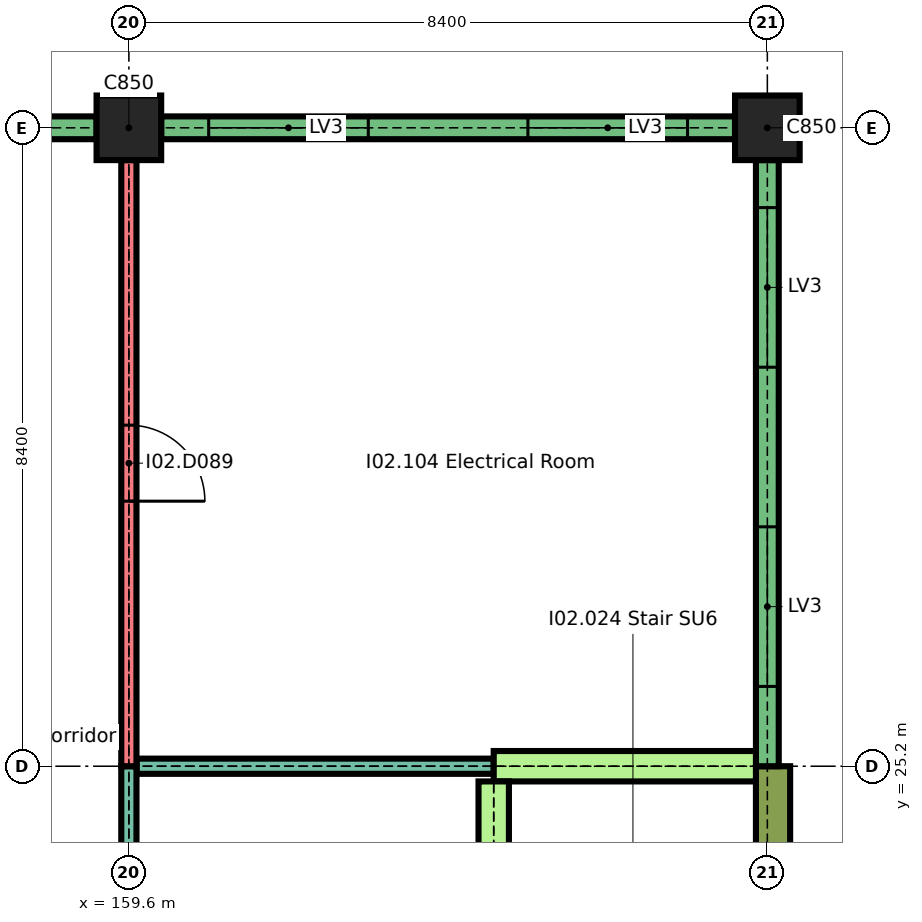
"""IFC4 building model, lengths in metres.
Left out: names, types, materials, properties, quantities, classifications, styles, units other than length and angle.
Written with IfcOpenShell. Run it as: python <this file> out.ifc"""

import sys

from ifc_helpers import new_model, si_unit, direction, frame, frame_2d, origin, origin_2d, place, context, subcontext, project, spatial, rectangle, extrude, element, fill, save


model = new_model("IFC4")
c1 = context("Model", 3, precision=1e-05, world=origin(), true_north=direction((0.0, 1.0)))
c2 = subcontext(c1, "Body", "Model", "MODEL_VIEW")
j1 = project(units=[si_unit("LENGTHUNIT", "METRE"), si_unit("PLANEANGLEUNIT", "RADIAN")], contexts=[c1])
p1 = place(None, origin())
s1 = spatial("IfcSite", under=j1, at=p1, CompositionType="ELEMENT")
p2 = place(p1, origin())
s2 = spatial("IfcBuilding", under=s1, at=p2, CompositionType="ELEMENT")
p3 = place(p2, frame((0.0, 0.0, 12.9)))
s3 = spatial("IfcBuildingStorey", under=s2, at=p3, CompositionType="ELEMENT", Elevation=12.9)
for number, where, z_axis, x_axis in (
    (1, (159.6, 33.6, 0.0), (0.0, 0.0, 1.0), (1.0, 0.0, 0.0)),
    (2, (168.0, 33.6, 0.0), (0.0, 0.0, 1.0), (1.0, 0.0, 0.0)),
):
    element("IfcColumn", number, at=place(p3, frame(where, z_axis=z_axis, x_axis=x_axis)), inside=s3, PredefinedType="COLUMN", context=c2, shape_type="SweptSolid", body=[
        extrude(rectangle(XDim=0.85, YDim=0.85, at=origin_2d()), origin(), (0.0, 0.0, 1.0), 2.04),
    ])
p4 = place(p3, frame((157.0, 33.6, 0.0), z_axis=(0.0, 0.0, 1.0), x_axis=(1.0, 0.0, 0.0)))
e3 = element("IfcWall", 3, at=p4, inside=s3, PredefinedType="SOLIDWALL", context=c2, shape_type="SweptSolid", body=[
    extrude(rectangle(XDim=2.175, YDim=0.3, at=frame_2d((1.087, 0.0))), origin(), (0.0, 0.0, 1.0), 1.74),
])
p5 = place(p3, frame((160.025, 33.6, 0.0), z_axis=(0.0, 0.0, 1.0), x_axis=(1.0, 0.0, 0.0)))
e4 = element("IfcWall", 4, at=p5, inside=s3, PredefinedType="SOLIDWALL", context=c2, shape_type="SweptSolid", body=[
    extrude(rectangle(XDim=7.55, YDim=0.3, at=frame_2d((3.775, 0.0))), origin(), (0.0, 0.0, 1.0), 1.74),
])
p6 = place(p5, frame((0.625, 0.0, 0.6)))
e5 = element("IfcOpeningElement", 5, at=p6, cuts=e4, PredefinedType="OPENING", context=c2, shape_type="SweptSolid", body=[
    extrude(rectangle(XDim=2.1, YDim=1.05, at=frame_2d((1.05, 0.525))), frame((0.0, 0.16, 0.0), z_axis=(0.0, -1.0, 0.0), x_axis=(1.0, 0.0, 0.0)), (0.0, 0.0, 1.0), 0.32),
])
p7 = place(p5, frame((4.825, 0.0, 0.6)))
e6 = element("IfcOpeningElement", 6, at=p7, cuts=e4, PredefinedType="OPENING", context=c2, shape_type="SweptSolid", body=[
    extrude(rectangle(XDim=2.1, YDim=1.05, at=frame_2d((1.05, 0.525))), frame((0.0, 0.16, 0.0), z_axis=(0.0, -1.0, 0.0), x_axis=(1.0, 0.0, 0.0)), (0.0, 0.0, 1.0), 0.32),
])
p8 = place(p3, frame((168.075, 21.35, 0.0), z_axis=(0.0, 0.0, 1.0), x_axis=(0.0, 1.0, 0.0)))
e7 = element("IfcWall", 7, at=p8, inside=s3, PredefinedType="SOLIDWALL", context=c2, shape_type="SweptSolid", body=[
    extrude(rectangle(XDim=3.85, YDim=0.45, at=frame_2d((1.925, 0.0))), origin(), (0.0, 0.0, 1.0), 2.04),
])
p9 = place(p3, frame((168.0, 25.2, 0.0), z_axis=(0.0, 0.0, 1.0), x_axis=(0.0, 1.0, 0.0)))
e8 = element("IfcWall", 8, at=p9, inside=s3, PredefinedType="SOLIDWALL", context=c2, shape_type="SweptSolid", body=[
    extrude(rectangle(XDim=7.975, YDim=0.3, at=frame_2d((3.988, 0.0))), origin(), (0.0, 0.0, 1.0), 1.74),
])
p10 = place(p9, frame((1.05, 0.0, 0.6)))
e9 = element("IfcOpeningElement", 9, at=p10, cuts=e8, PredefinedType="OPENING", context=c2, shape_type="SweptSolid", body=[
    extrude(rectangle(XDim=2.1, YDim=1.05, at=frame_2d((1.05, 0.525))), frame((0.0, 0.16, 0.0), z_axis=(0.0, -1.0, 0.0), x_axis=(1.0, 0.0, 0.0)), (0.0, 0.0, 1.0), 0.32),
])
p11 = place(p9, frame((5.25, 0.0, 0.6)))
e10 = element("IfcOpeningElement", 10, at=p11, cuts=e8, PredefinedType="OPENING", context=c2, shape_type="SweptSolid", body=[
    extrude(rectangle(XDim=2.1, YDim=1.05, at=frame_2d((1.05, 0.525))), frame((0.0, 0.16, 0.0), z_axis=(0.0, -1.0, 0.0), x_axis=(1.0, 0.0, 0.0)), (0.0, 0.0, 1.0), 0.32),
])
p12 = place(p3, frame((159.7, 25.2, 0.0), z_axis=(0.0, 0.0, 1.0), x_axis=(1.0, 0.0, 0.0)))
e11 = element("IfcWall", 11, at=p12, inside=s3, PredefinedType="PARTITIONING", context=c2, shape_type="SweptSolid", body=[
    extrude(rectangle(XDim=4.7, YDim=0.2, at=frame_2d((2.35, 0.0))), origin(), (0.0, 0.0, 1.0), 2.04),
])
p13 = place(p3, frame((164.4, 25.2, 0.0), z_axis=(0.0, 0.0, 1.0), x_axis=(1.0, 0.0, 0.0)))
e12 = element("IfcWall", 12, at=p13, inside=s3, PredefinedType="SHEAR", context=c2, shape_type="SweptSolid", body=[
    extrude(rectangle(XDim=3.45, YDim=0.4, at=frame_2d((1.725, 0.0))), origin(), (0.0, 0.0, 1.0), 2.04),
])
p14 = place(p3, frame((159.6, 16.8, 0.0), z_axis=(0.0, 0.0, 1.0), x_axis=(0.0, 1.0, 0.0)))
e13 = element("IfcWall", 13, at=p14, inside=s3, PredefinedType="PARTITIONING", context=c2, shape_type="SweptSolid", body=[
    extrude(rectangle(XDim=8.4, YDim=0.2, at=frame_2d((4.2, 0.0))), origin(), (0.0, 0.0, 1.0), 2.04),
])
p15 = place(p14, frame((3.5, 0.0, 0.0)))
e14 = element("IfcOpeningElement", 14, at=p15, cuts=e13, PredefinedType="OPENING", context=c2, shape_type="SweptSolid", body=[
    extrude(rectangle(XDim=1.4, YDim=2.0, at=frame_2d((0.7, 1.0))), frame((0.0, 0.11, 0.0), z_axis=(0.0, -1.0, 0.0), x_axis=(1.0, 0.0, 0.0)), (0.0, 0.0, 1.0), 0.22),
])
p16 = place(p3, frame((159.6, 25.2, 0.0), z_axis=(0.0, 0.0, 1.0), x_axis=(0.0, 1.0, 0.0)))
e15 = element("IfcWall", 15, at=p16, inside=s3, PredefinedType="SOLIDWALL", context=c2, shape_type="SweptSolid", body=[
    extrude(rectangle(XDim=7.975, YDim=0.2, at=frame_2d((3.988, 0.0))), origin(), (0.0, 0.0, 1.0), 2.04),
])
p17 = place(p16, frame((3.488, 0.0, 0.0)))
e16 = element("IfcOpeningElement", 16, at=p17, cuts=e15, PredefinedType="OPENING", context=c2, shape_type="SweptSolid", body=[
    extrude(rectangle(XDim=1.0, YDim=2.0, at=frame_2d((0.5, 1.0))), frame((0.0, 0.11, 0.0), z_axis=(0.0, -1.0, 0.0), x_axis=(1.0, 0.0, 0.0)), (0.0, 0.0, 1.0), 0.22),
])
p18 = place(p3, frame((164.4, 17.0, 0.0), z_axis=(0.0, 0.0, 1.0), x_axis=(0.0, 1.0, 0.0)))
e17 = element("IfcWall", 17, at=p18, inside=s3, PredefinedType="SHEAR", context=c2, shape_type="SweptSolid", body=[
    extrude(rectangle(XDim=8.0, YDim=0.4, at=frame_2d((4.0, 0.0))), origin(), (0.0, 0.0, 1.0), 2.04),
])
p19 = place(p18, frame((0.4, 0.0, 0.0)))
e18 = element("IfcOpeningElement", 18, at=p19, cuts=e17, PredefinedType="OPENING", context=c2, shape_type="SweptSolid", body=[
    extrude(rectangle(XDim=1.2, YDim=2.0, at=frame_2d((0.6, 1.0))), frame((0.0, 0.21, 0.0), z_axis=(0.0, -1.0, 0.0), x_axis=(1.0, 0.0, 0.0)), (0.0, 0.0, 1.0), 0.42),
])
p20 = place(p6, origin())
e19 = element("IfcWindow", 19, at=p20, inside=s3, PartitioningType="SINGLE_PANEL", PredefinedType="WINDOW", context=c2, shape_type="SweptSolid", body=[
    extrude(rectangle(XDim=2.1, YDim=1.05, at=frame_2d((1.05, 0.525))), frame((0.0, 0.075, 0.0), z_axis=(0.0, -1.0, 0.0), x_axis=(1.0, 0.0, 0.0)), (0.0, 0.0, 1.0), 0.15),
])
fill(e5, e19)
p21 = place(p7, origin())
e20 = element("IfcWindow", 20, at=p21, inside=s3, PartitioningType="SINGLE_PANEL", PredefinedType="WINDOW", context=c2, shape_type="SweptSolid", body=[
    extrude(rectangle(XDim=2.1, YDim=1.05, at=frame_2d((1.05, 0.525))), frame((0.0, 0.075, 0.0), z_axis=(0.0, -1.0, 0.0), x_axis=(1.0, 0.0, 0.0)), (0.0, 0.0, 1.0), 0.15),
])
fill(e6, e20)
p22 = place(p10, origin())
e21 = element("IfcWindow", 21, at=p22, inside=s3, PartitioningType="SINGLE_PANEL", PredefinedType="WINDOW", context=c2, shape_type="SweptSolid", body=[
    extrude(rectangle(XDim=2.1, YDim=1.05, at=frame_2d((1.05, 0.525))), frame((0.0, 0.075, 0.0), z_axis=(0.0, -1.0, 0.0), x_axis=(1.0, 0.0, 0.0)), (0.0, 0.0, 1.0), 0.15),
])
fill(e9, e21)
p23 = place(p11, origin())
e22 = element("IfcWindow", 22, at=p23, inside=s3, PartitioningType="SINGLE_PANEL", PredefinedType="WINDOW", context=c2, shape_type="SweptSolid", body=[
    extrude(rectangle(XDim=2.1, YDim=1.05, at=frame_2d((1.05, 0.525))), frame((0.0, 0.075, 0.0), z_axis=(0.0, -1.0, 0.0), x_axis=(1.0, 0.0, 0.0)), (0.0, 0.0, 1.0), 0.15),
])
fill(e10, e22)
p24 = place(p17, origin())
e23 = element("IfcDoor", 23, at=p24, inside=s3, OperationType="SINGLE_SWING_LEFT", PredefinedType="DOOR", context=c2, shape_type="SweptSolid", body=[
    extrude(rectangle(XDim=1.0, YDim=2.0, at=frame_2d((0.5, 1.0))), frame((0.0, 0.025, 0.0), z_axis=(0.0, -1.0, 0.0), x_axis=(1.0, 0.0, 0.0)), (0.0, 0.0, 1.0), 0.05),
])
fill(e16, e23)
save(model, sys.argv[1])
